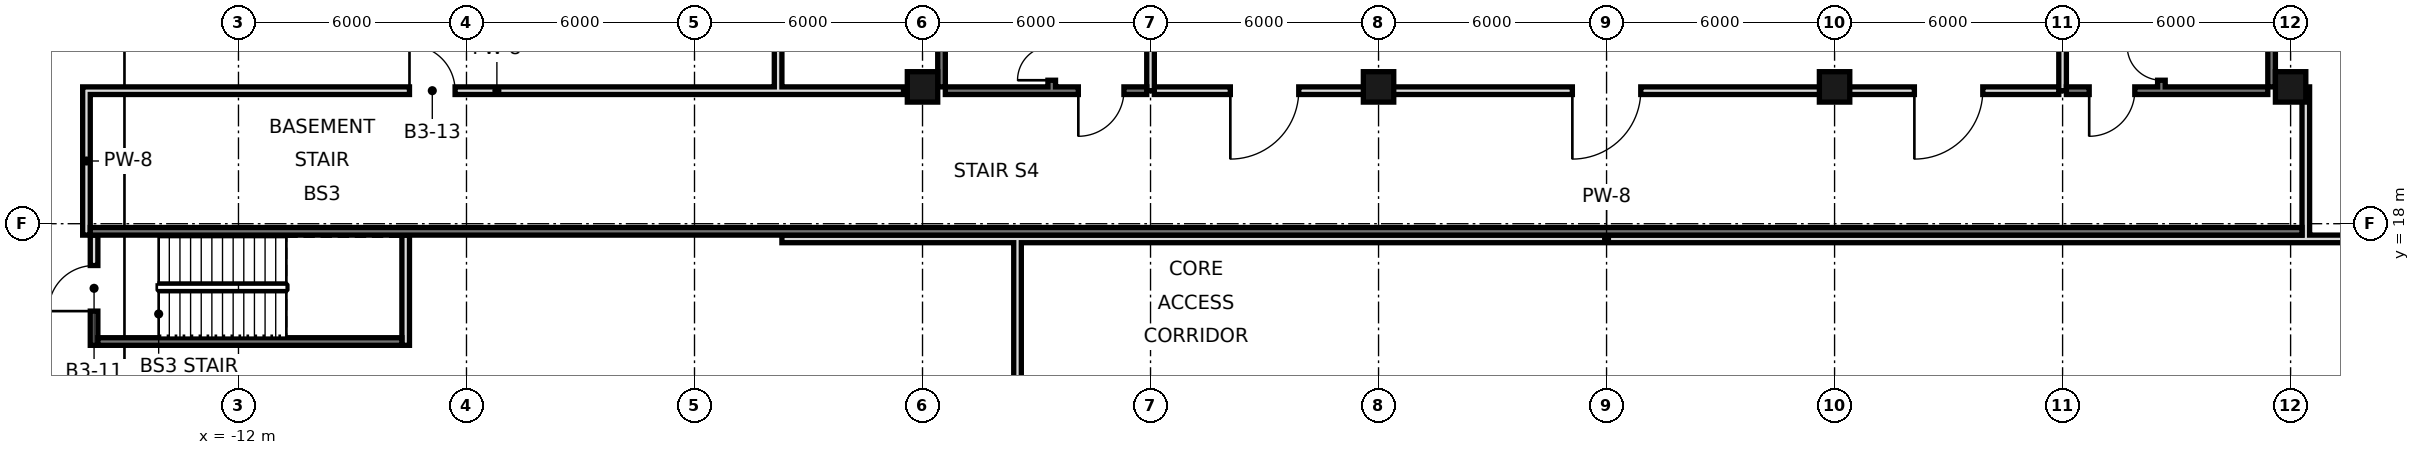
"""IFC4 building model, lengths in metres.
Left out: names, types, materials, properties, quantities, classifications, styles, units other than length and angle.
Written with IfcOpenShell. Run it as: python <this file> out.ifc"""

import sys

from ifc_helpers import new_model, si_unit, direction, frame, frame_2d, origin, origin_2d, place, context, subcontext, project, spatial, rectangle, hollow_rectangle, extrude, element, fill, save


model = new_model("IFC4")
c1 = context("Model", 3, precision=1e-05, world=origin(), true_north=direction((0.0, 1.0)))
c2 = subcontext(c1, "Body", "Model", "MODEL_VIEW")
j1 = project(units=[si_unit("LENGTHUNIT", "METRE"), si_unit("PLANEANGLEUNIT", "RADIAN")], contexts=[c1])
p1 = place(None, origin())
s1 = spatial("IfcSite", under=j1, at=p1, CompositionType="ELEMENT")
p2 = place(p1, origin())
s2 = spatial("IfcBuilding", under=s1, at=p2, CompositionType="ELEMENT")
p3 = place(p2, frame((0.0, 0.0, -13.5)))
s3 = spatial("IfcBuildingStorey", under=s2, at=p3, CompositionType="ELEMENT", Elevation=-13.5)
for number, where, z_axis, x_axis in (
    (1, (6.0, 21.6, 0.0), (0.0, 0.0, 1.0), (1.0, 0.0, 0.0)),
    (2, (18.0, 21.6, 0.0), (0.0, 0.0, 1.0), (1.0, 0.0, 0.0)),
    (3, (30.0, 21.6, 0.0), (0.0, 0.0, 1.0), (1.0, 0.0, 0.0)),
    (4, (42.0, 21.6, 0.0), (0.0, 0.0, 1.0), (1.0, 0.0, 0.0)),
):
    element("IfcColumn", number, at=place(p3, frame(where, z_axis=z_axis, x_axis=x_axis)), inside=s3, PredefinedType="COLUMN", context=c2, shape_type="SweptSolid", body=[
        extrude(hollow_rectangle(XDim=0.8, YDim=0.8, WallThickness=0.07, at=origin_2d()), origin(), (0.0, 0.0, 1.0), 4.5),
    ])
p4 = place(p3, frame((-16.0, 17.7, 0.0), z_axis=(0.0, 0.0, 1.0), x_axis=(0.0, 1.0, 0.0)))
e5 = element("IfcWall", 5, at=p4, inside=s3, PredefinedType="SOLIDWALL", context=c2, shape_type="SweptSolid", body=[
    extrude(rectangle(XDim=3.9, YDim=0.2, at=frame_2d((1.95, 0.0))), origin(), (0.0, 0.0, 1.0), 4.15),
])
p5 = place(p3, frame((-15.8, 14.8, 0.0), z_axis=(0.0, 0.0, 1.0), x_axis=(0.0, 1.0, 0.0)))
e6 = element("IfcWall", 6, at=p5, inside=s3, PredefinedType="SOLIDWALL", context=c2, shape_type="SweptSolid", body=[
    extrude(rectangle(XDim=2.9, YDim=0.2, at=frame_2d((1.45, 0.0))), origin(), (0.0, 0.0, 1.0), 4.15),
])
p6 = place(p5, frame((0.9, 0.0, 0.0)))
e7 = element("IfcOpeningElement", 7, at=p6, cuts=e6, PredefinedType="OPENING", context=c2, shape_type="SweptSolid", body=[
    extrude(rectangle(XDim=1.2, YDim=2.4, at=frame_2d((0.6, 1.2))), frame((0.0, 0.11, 0.0), z_axis=(0.0, -1.0, 0.0), x_axis=(1.0, 0.0, 0.0)), (0.0, 0.0, 1.0), 0.22),
])
p7 = place(p3, frame((-7.6, 14.8, 0.0), z_axis=(0.0, 0.0, 1.0), x_axis=(0.0, 1.0, 0.0)))
e8 = element("IfcWall", 8, at=p7, inside=s3, PredefinedType="SOLIDWALL", context=c2, shape_type="SweptSolid", body=[
    extrude(rectangle(XDim=2.9, YDim=0.2, at=frame_2d((1.45, 0.0))), origin(), (0.0, 0.0, 1.0), 4.15),
])
p8 = place(p3, frame((2.2, 21.6, 0.0), z_axis=(0.0, 0.0, 1.0), x_axis=(0.0, 1.0, 0.0)))
e9 = element("IfcWall", 9, at=p8, inside=s3, PredefinedType="SOLIDWALL", context=c2, shape_type="SweptSolid", body=[
    extrude(rectangle(XDim=28.0, YDim=0.2, at=frame_2d((14.0, 0.0))), origin(), (0.0, 0.0, 1.0), 3.05),
])
p9 = place(p3, frame((8.5, -11.0, 0.0), z_axis=(0.0, 0.0, 1.0), x_axis=(0.0, 1.0, 0.0)))
e10 = element("IfcWall", 10, at=p9, inside=s3, PredefinedType="SOLIDWALL", context=c2, shape_type="SweptSolid", body=[
    extrude(rectangle(XDim=28.5, YDim=0.2, at=frame_2d((14.25, 0.0))), origin(), (0.0, 0.0, 1.0), 3.05),
])
p10 = place(p9, frame((0.25, 0.0, 0.0)))
e11 = element("IfcOpeningElement", 11, at=p10, cuts=e10, PredefinedType="OPENING", context=c2, shape_type="SweptSolid", body=[
    extrude(rectangle(XDim=5.3, YDim=2.4, at=frame_2d((2.65, 1.2))), frame((0.0, 0.11, 0.0), z_axis=(0.0, -1.0, 0.0), x_axis=(1.0, 0.0, 0.0)), (0.0, 0.0, 1.0), 0.22),
])
p11 = place(p9, frame((14.25, 0.0, 0.0)))
e12 = element("IfcOpeningElement", 12, at=p11, cuts=e10, PredefinedType="OPENING", context=c2, shape_type="SweptSolid", body=[
    extrude(rectangle(XDim=5.5, YDim=2.4, at=frame_2d((2.75, 1.2))), frame((0.0, 0.11, 0.0), z_axis=(0.0, -1.0, 0.0), x_axis=(1.0, 0.0, 0.0)), (0.0, 0.0, 1.0), 0.22),
])
p12 = place(p3, frame((42.4, 17.7, 0.0), z_axis=(0.0, 0.0, 1.0), x_axis=(0.0, 1.0, 0.0)))
e13 = element("IfcWall", 13, at=p12, inside=s3, PredefinedType="SOLIDWALL", context=c2, shape_type="SweptSolid", body=[
    extrude(rectangle(XDim=3.9, YDim=0.2, at=frame_2d((1.95, 0.0))), origin(), (0.0, 0.0, 1.0), 4.15),
])
p13 = place(p3, frame((-15.7, 14.9, 0.0), z_axis=(0.0, 0.0, 1.0), x_axis=(1.0, 0.0, 0.0)))
e14 = element("IfcWall", 14, at=p13, inside=s3, PredefinedType="SOLIDWALL", context=c2, shape_type="SweptSolid", body=[
    extrude(rectangle(XDim=8.0, YDim=0.2, at=frame_2d((4.0, 0.0))), origin(), (0.0, 0.0, 1.0), 4.15),
])
p14 = place(p3, frame((2.3, 17.6, 0.0), z_axis=(0.0, 0.0, 1.0), x_axis=(1.0, 0.0, 0.0)))
e15 = element("IfcWall", 15, at=p14, inside=s3, PredefinedType="SOLIDWALL", context=c2, shape_type="SweptSolid", body=[
    extrude(rectangle(XDim=43.4, YDim=0.2, at=frame_2d((21.7, 0.0))), origin(), (0.0, 0.0, 1.0), 3.05),
])
p15 = place(p3, frame((-15.9, 17.8, 0.0), z_axis=(0.0, 0.0, 1.0), x_axis=(1.0, 0.0, 0.0)))
e16 = element("IfcWall", 16, at=p15, inside=s3, PredefinedType="SOLIDWALL", context=c2, shape_type="SweptSolid", body=[
    extrude(rectangle(XDim=58.2, YDim=0.2, at=frame_2d((29.1, 0.0))), origin(), (0.0, 0.0, 1.0), 3.05),
])
p16 = place(p3, frame((-15.9, 21.5, 0.0), z_axis=(0.0, 0.0, 1.0), x_axis=(1.0, 0.0, 0.0)))
e17 = element("IfcWall", 17, at=p16, inside=s3, PredefinedType="SOLIDWALL", context=c2, shape_type="SweptSolid", body=[
    extrude(rectangle(XDim=21.4, YDim=0.2, at=frame_2d((10.7, 0.0))), origin(), (0.0, 0.0, 1.0), 3.05),
])
p17 = place(p16, frame((8.4, 0.0, 0.0)))
e18 = element("IfcOpeningElement", 18, at=p17, cuts=e17, PredefinedType="OPENING", context=c2, shape_type="SweptSolid", body=[
    extrude(rectangle(XDim=1.2, YDim=2.4, at=frame_2d((0.6, 1.2))), frame((0.0, 0.11, 0.0), z_axis=(0.0, -1.0, 0.0), x_axis=(1.0, 0.0, 0.0)), (0.0, 0.0, 1.0), 0.22),
])
for number, where, z_axis, x_axis in (
    (19, (6.5, 21.6, 0.0), (0.0, 0.0, 1.0), (0.0, 1.0, 0.0)),
    (20, (41.5, 21.6, 0.0), (0.0, 0.0, 1.0), (0.0, 1.0, 0.0)),
):
    element("IfcWall", number, at=place(p3, frame(where, z_axis=z_axis, x_axis=x_axis)), inside=s3, PredefinedType="SOLIDWALL", context=c2, shape_type="SweptSolid", body=[
        extrude(rectangle(XDim=23.5, YDim=0.2, at=frame_2d((11.75, 0.0))), origin(), (0.0, 0.0, 1.0), 4.15),
    ])
p18 = place(p3, frame((12.1, 21.5, 0.0), z_axis=(0.0, 0.0, 1.0), x_axis=(1.0, 0.0, 0.0)))
e21 = element("IfcWall", 21, at=p18, inside=s3, PredefinedType="SOLIDWALL", context=c2, shape_type="SweptSolid", body=[
    extrude(rectangle(XDim=23.8, YDim=0.2, at=frame_2d((11.9, 0.0))), origin(), (0.0, 0.0, 1.0), 3.05),
])
p19 = place(p18, frame((2.0, 0.0, 0.0)))
e22 = element("IfcOpeningElement", 22, at=p19, cuts=e21, PredefinedType="OPENING", context=c2, shape_type="SweptSolid", body=[
    extrude(rectangle(XDim=1.8, YDim=2.1, at=frame_2d((0.9, 1.05))), frame((0.0, 0.11, 0.0), z_axis=(0.0, -1.0, 0.0), x_axis=(1.0, 0.0, 0.0)), (0.0, 0.0, 1.0), 0.22),
])
p20 = place(p18, frame((11.0, 0.0, 0.0)))
e23 = element("IfcOpeningElement", 23, at=p20, cuts=e21, PredefinedType="OPENING", context=c2, shape_type="SweptSolid", body=[
    extrude(rectangle(XDim=1.8, YDim=2.1, at=frame_2d((0.9, 1.05))), frame((0.0, 0.11, 0.0), z_axis=(0.0, -1.0, 0.0), x_axis=(1.0, 0.0, 0.0)), (0.0, 0.0, 1.0), 0.22),
])
p21 = place(p18, frame((20.0, 0.0, 0.0)))
e24 = element("IfcOpeningElement", 24, at=p21, cuts=e21, PredefinedType="OPENING", context=c2, shape_type="SweptSolid", body=[
    extrude(rectangle(XDim=1.8, YDim=2.1, at=frame_2d((0.9, 1.05))), frame((0.0, 0.11, 0.0), z_axis=(0.0, -1.0, 0.0), x_axis=(1.0, 0.0, 0.0)), (0.0, 0.0, 1.0), 0.22),
])
for number, where, z_axis, x_axis in (
    (25, (12.0, 21.5, 0.0), (0.0, 0.0, 1.0), (0.0, 1.0, 0.0)),
    (26, (36.0, 21.5, 0.0), (0.0, 0.0, 1.0), (0.0, 1.0, 0.0)),
):
    element("IfcWall", number, at=place(p3, frame(where, z_axis=z_axis, x_axis=x_axis)), inside=s3, PredefinedType="PARTITIONING", context=c2, shape_type="SweptSolid", body=[
        extrude(rectangle(XDim=6.0, YDim=0.2, at=frame_2d((3.0, 0.0))), origin(), (0.0, 0.0, 1.0), 3.05),
    ])
p22 = place(p3, frame((38.6, 21.5, 0.0), z_axis=(0.0, 0.0, 1.0), x_axis=(0.0, 1.0, 0.0)))
e27 = element("IfcWall", 27, at=p22, inside=s3, PredefinedType="SOLIDWALL", context=c2, shape_type="SweptSolid", body=[
    extrude(rectangle(XDim=23.5, YDim=0.2, at=frame_2d((11.75, 0.0))), origin(), (0.0, 0.0, 1.0), 3.05),
])
p23 = place(p22, frame((8.7, 0.0, 0.0)))
e28 = element("IfcOpeningElement", 28, at=p23, cuts=e27, PredefinedType="OPENING", context=c2, shape_type="SweptSolid", body=[
    extrude(rectangle(XDim=1.0, YDim=2.1, at=frame_2d((0.5, 1.05))), frame((0.0, 0.11, 0.0), z_axis=(0.0, -1.0, 0.0), x_axis=(1.0, 0.0, 0.0)), (0.0, 0.0, 1.0), 0.22),
])
p24 = place(p22, frame((13.35, 0.0, 0.0)))
e29 = element("IfcOpeningElement", 29, at=p24, cuts=e27, PredefinedType="OPENING", context=c2, shape_type="SweptSolid", body=[
    extrude(rectangle(XDim=1.0, YDim=2.1, at=frame_2d((0.5, 1.05))), frame((0.0, 0.11, 0.0), z_axis=(0.0, -1.0, 0.0), x_axis=(1.0, 0.0, 0.0)), (0.0, 0.0, 1.0), 0.22),
])
p25 = place(p22, frame((22.2, 0.0, 0.0)))
e30 = element("IfcOpeningElement", 30, at=p25, cuts=e27, PredefinedType="OPENING", context=c2, shape_type="SweptSolid", body=[
    extrude(rectangle(XDim=1.0, YDim=2.1, at=frame_2d((0.5, 1.05))), frame((0.0, 0.11, 0.0), z_axis=(0.0, -1.0, 0.0), x_axis=(1.0, 0.0, 0.0)), (0.0, 0.0, 1.0), 0.22),
])
p26 = place(p22, frame((0.275, 0.0, 0.0)))
e31 = element("IfcOpeningElement", 31, at=p26, cuts=e27, PredefinedType="OPENING", context=c2, shape_type="SweptSolid", body=[
    extrude(rectangle(XDim=0.9, YDim=2.1, at=frame_2d((0.45, 1.05))), frame((0.0, 0.11, 0.0), z_axis=(0.0, -1.0, 0.0), x_axis=(1.0, 0.0, 0.0)), (0.0, 0.0, 1.0), 0.22),
])
p27 = place(p3, frame((9.4, 21.5, 0.0), z_axis=(0.0, 0.0, 1.0), x_axis=(0.0, 1.0, 0.0)))
e32 = element("IfcWall", 32, at=p27, inside=s3, PredefinedType="SOLIDWALL", context=c2, shape_type="SweptSolid", body=[
    extrude(rectangle(XDim=23.5, YDim=0.2, at=frame_2d((11.75, 0.0))), origin(), (0.0, 0.0, 1.0), 3.05),
])
p28 = place(p27, frame((7.1, 0.0, 0.0)))
e33 = element("IfcOpeningElement", 33, at=p28, cuts=e32, PredefinedType="OPENING", context=c2, shape_type="SweptSolid", body=[
    extrude(rectangle(XDim=1.1, YDim=2.1, at=frame_2d((0.55, 1.05))), frame((0.0, 0.11, 0.0), z_axis=(0.0, -1.0, 0.0), x_axis=(1.0, 0.0, 0.0)), (0.0, 0.0, 1.0), 0.22),
])
p29 = place(p27, frame((10.2, 0.0, 0.0)))
e34 = element("IfcOpeningElement", 34, at=p29, cuts=e32, PredefinedType="OPENING", context=c2, shape_type="SweptSolid", body=[
    extrude(rectangle(XDim=1.1, YDim=2.1, at=frame_2d((0.55, 1.05))), frame((0.0, 0.11, 0.0), z_axis=(0.0, -1.0, 0.0), x_axis=(1.0, 0.0, 0.0)), (0.0, 0.0, 1.0), 0.22),
])
p30 = place(p27, frame((13.3, 0.0, 0.0)))
e35 = element("IfcOpeningElement", 35, at=p30, cuts=e32, PredefinedType="OPENING", context=c2, shape_type="SweptSolid", body=[
    extrude(rectangle(XDim=1.1, YDim=2.1, at=frame_2d((0.55, 1.05))), frame((0.0, 0.11, 0.0), z_axis=(0.0, -1.0, 0.0), x_axis=(1.0, 0.0, 0.0)), (0.0, 0.0, 1.0), 0.22),
])
p31 = place(p27, frame((22.2, 0.0, 0.0)))
e36 = element("IfcOpeningElement", 36, at=p31, cuts=e32, PredefinedType="OPENING", context=c2, shape_type="SweptSolid", body=[
    extrude(rectangle(XDim=1.0, YDim=2.1, at=frame_2d((0.5, 1.05))), frame((0.0, 0.11, 0.0), z_axis=(0.0, -1.0, 0.0), x_axis=(1.0, 0.0, 0.0)), (0.0, 0.0, 1.0), 0.22),
])
p32 = place(p27, frame((0.275, 0.0, 0.0)))
e37 = element("IfcOpeningElement", 37, at=p32, cuts=e32, PredefinedType="OPENING", context=c2, shape_type="SweptSolid", body=[
    extrude(rectangle(XDim=0.9, YDim=2.1, at=frame_2d((0.45, 1.05))), frame((0.0, 0.11, 0.0), z_axis=(0.0, -1.0, 0.0), x_axis=(1.0, 0.0, 0.0)), (0.0, 0.0, 1.0), 0.22),
])
p33 = place(p3, frame((36.1, 21.5, 0.0), z_axis=(0.0, 0.0, 1.0), x_axis=(1.0, 0.0, 0.0)))
e38 = element("IfcWall", 38, at=p33, inside=s3, PredefinedType="SOLIDWALL", context=c2, shape_type="SweptSolid", body=[
    extrude(rectangle(XDim=5.3, YDim=0.2, at=frame_2d((2.65, 0.0))), origin(), (0.0, 0.0, 1.0), 3.05),
])
p34 = place(p33, frame((0.6, 0.0, 0.0)))
e39 = element("IfcOpeningElement", 39, at=p34, cuts=e38, PredefinedType="OPENING", context=c2, shape_type="SweptSolid", body=[
    extrude(rectangle(XDim=1.2, YDim=2.1, at=frame_2d((0.6, 1.05))), frame((0.0, 0.11, 0.0), z_axis=(0.0, -1.0, 0.0), x_axis=(1.0, 0.0, 0.0)), (0.0, 0.0, 1.0), 0.22),
])
p35 = place(p3, frame((6.6, 21.5, 0.0), z_axis=(0.0, 0.0, 1.0), x_axis=(1.0, 0.0, 0.0)))
e40 = element("IfcWall", 40, at=p35, inside=s3, PredefinedType="SOLIDWALL", context=c2, shape_type="SweptSolid", body=[
    extrude(rectangle(XDim=5.3, YDim=0.2, at=frame_2d((2.65, 0.0))), origin(), (0.0, 0.0, 1.0), 3.05),
])
p36 = place(p35, frame((3.5, 0.0, 0.0)))
e41 = element("IfcOpeningElement", 41, at=p36, cuts=e40, PredefinedType="OPENING", context=c2, shape_type="SweptSolid", body=[
    extrude(rectangle(XDim=1.2, YDim=2.1, at=frame_2d((0.6, 1.05))), frame((0.0, 0.11, 0.0), z_axis=(0.0, -1.0, 0.0), x_axis=(1.0, 0.0, 0.0)), (0.0, 0.0, 1.0), 0.22),
])
p37 = place(p6, origin())
e42 = element("IfcDoor", 42, at=p37, inside=s3, OperationType="SINGLE_SWING_LEFT", PredefinedType="DOOR", context=c2, shape_type="SweptSolid", body=[
    extrude(rectangle(XDim=1.2, YDim=2.4, at=frame_2d((0.6, 1.2))), frame((0.0, 0.025, 0.0), z_axis=(0.0, -1.0, 0.0), x_axis=(1.0, 0.0, 0.0)), (0.0, 0.0, 1.0), 0.05),
])
fill(e7, e42)
p38 = place(p17, origin())
e43 = element("IfcDoor", 43, at=p38, inside=s3, OperationType="SINGLE_SWING_LEFT", PredefinedType="DOOR", context=c2, shape_type="SweptSolid", body=[
    extrude(rectangle(XDim=1.2, YDim=2.4, at=frame_2d((0.6, 1.2))), frame((0.0, 0.025, 0.0), z_axis=(0.0, -1.0, 0.0), x_axis=(1.0, 0.0, 0.0)), (0.0, 0.0, 1.0), 0.05),
])
fill(e18, e43)
p39 = place(p19, frame((1.8, 0.0, 0.0), z_axis=(0.0, 0.0, 1.0), x_axis=(-1.0, 0.0, 0.0)))
e44 = element("IfcDoor", 44, at=p39, inside=s3, OperationType="SINGLE_SWING_RIGHT", PredefinedType="DOOR", context=c2, shape_type="SweptSolid", body=[
    extrude(rectangle(XDim=1.8, YDim=2.1, at=frame_2d((0.9, 1.05))), frame((0.0, 0.025, 0.0), z_axis=(0.0, -1.0, 0.0), x_axis=(1.0, 0.0, 0.0)), (0.0, 0.0, 1.0), 0.05),
])
fill(e22, e44)
p40 = place(p20, frame((1.8, 0.0, 0.0), z_axis=(0.0, 0.0, 1.0), x_axis=(-1.0, 0.0, 0.0)))
e45 = element("IfcDoor", 45, at=p40, inside=s3, OperationType="SINGLE_SWING_RIGHT", PredefinedType="DOOR", context=c2, shape_type="SweptSolid", body=[
    extrude(rectangle(XDim=1.8, YDim=2.1, at=frame_2d((0.9, 1.05))), frame((0.0, 0.025, 0.0), z_axis=(0.0, -1.0, 0.0), x_axis=(1.0, 0.0, 0.0)), (0.0, 0.0, 1.0), 0.05),
])
fill(e23, e45)
p41 = place(p21, frame((1.8, 0.0, 0.0), z_axis=(0.0, 0.0, 1.0), x_axis=(-1.0, 0.0, 0.0)))
e46 = element("IfcDoor", 46, at=p41, inside=s3, OperationType="SINGLE_SWING_RIGHT", PredefinedType="DOOR", context=c2, shape_type="SweptSolid", body=[
    extrude(rectangle(XDim=1.8, YDim=2.1, at=frame_2d((0.9, 1.05))), frame((0.0, 0.025, 0.0), z_axis=(0.0, -1.0, 0.0), x_axis=(1.0, 0.0, 0.0)), (0.0, 0.0, 1.0), 0.05),
])
fill(e24, e46)
p42 = place(p36, frame((1.2, 0.0, 0.0), z_axis=(0.0, 0.0, 1.0), x_axis=(-1.0, 0.0, 0.0)))
e47 = element("IfcDoor", 47, at=p42, inside=s3, OperationType="SINGLE_SWING_RIGHT", PredefinedType="DOOR", context=c2, shape_type="SweptSolid", body=[
    extrude(rectangle(XDim=1.2, YDim=2.1, at=frame_2d((0.6, 1.05))), frame((0.0, 0.025, 0.0), z_axis=(0.0, -1.0, 0.0), x_axis=(1.0, 0.0, 0.0)), (0.0, 0.0, 1.0), 0.05),
])
fill(e41, e47)
p43 = place(p34, frame((1.2, 0.0, 0.0), z_axis=(0.0, 0.0, 1.0), x_axis=(-1.0, 0.0, 0.0)))
e48 = element("IfcDoor", 48, at=p43, inside=s3, OperationType="SINGLE_SWING_RIGHT", PredefinedType="DOOR", context=c2, shape_type="SweptSolid", body=[
    extrude(rectangle(XDim=1.2, YDim=2.1, at=frame_2d((0.6, 1.05))), frame((0.0, 0.025, 0.0), z_axis=(0.0, -1.0, 0.0), x_axis=(1.0, 0.0, 0.0)), (0.0, 0.0, 1.0), 0.05),
])
fill(e39, e48)
p44 = place(p32, origin())
e49 = element("IfcDoor", 49, at=p44, inside=s3, OperationType="SINGLE_SWING_LEFT", PredefinedType="DOOR", context=c2, shape_type="SweptSolid", body=[
    extrude(rectangle(XDim=0.9, YDim=2.1, at=frame_2d((0.45, 1.05))), frame((0.0, 0.025, 0.0), z_axis=(0.0, -1.0, 0.0), x_axis=(1.0, 0.0, 0.0)), (0.0, 0.0, 1.0), 0.05),
])
fill(e37, e49)
p45 = place(p26, frame((0.9, 0.0, 0.0), z_axis=(0.0, 0.0, 1.0), x_axis=(-1.0, 0.0, 0.0)))
e50 = element("IfcDoor", 50, at=p45, inside=s3, OperationType="SINGLE_SWING_LEFT", PredefinedType="DOOR", context=c2, shape_type="SweptSolid", body=[
    extrude(rectangle(XDim=0.9, YDim=2.1, at=frame_2d((0.45, 1.05))), frame((0.0, 0.025, 0.0), z_axis=(0.0, -1.0, 0.0), x_axis=(1.0, 0.0, 0.0)), (0.0, 0.0, 1.0), 0.05),
])
fill(e31, e50)
save(model, sys.argv[1])
